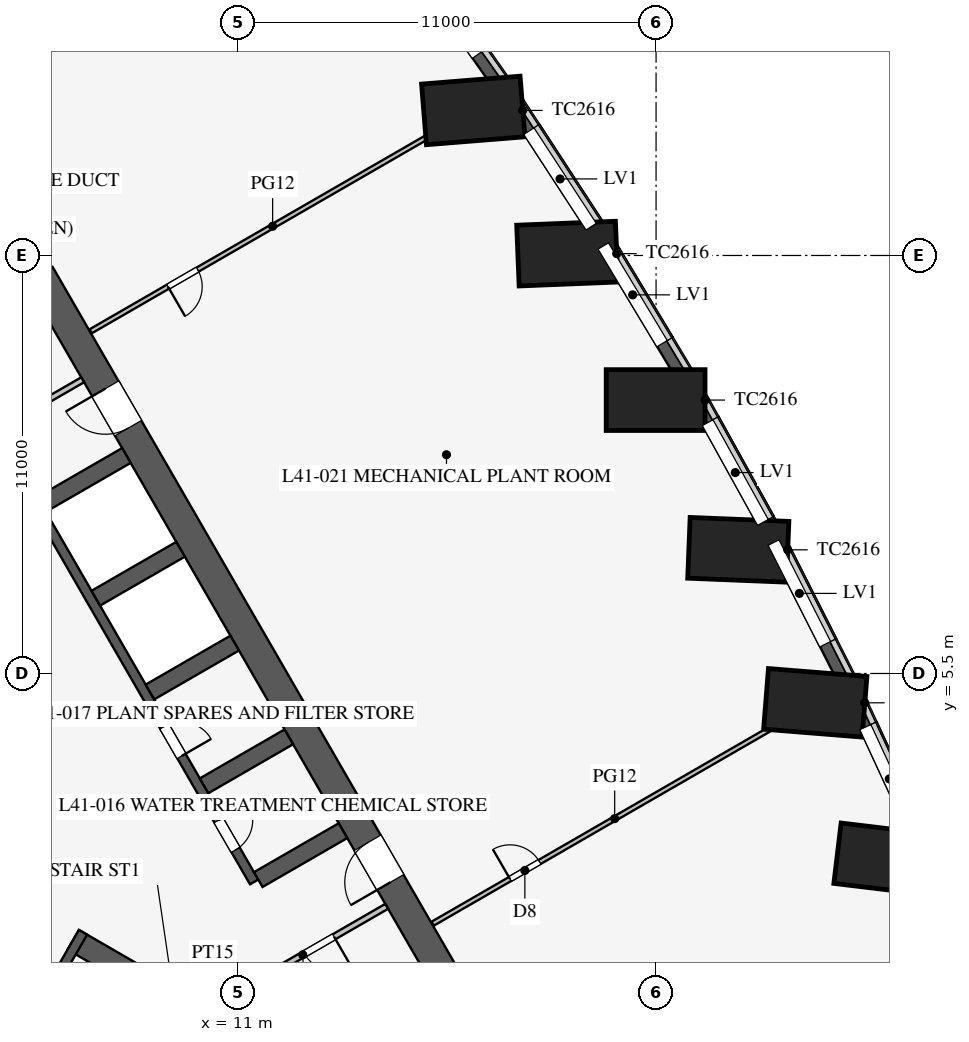
"""IFC4 building model, lengths in metres.
Left out: names, types, materials, properties, quantities, classifications, styles, units other than length and angle.
Written with IfcOpenShell. Run it as: python <this file> out.ifc"""

import sys

from ifc_helpers import new_model, si_unit, direction, frame, frame_2d, origin, origin_2d, place, context, subcontext, project, spatial, polyline, rectangle, outline, extrude, clip, halfspace, element, fill, save


model = new_model("IFC4")
c1 = context("Model", 3, precision=1e-05, world=origin(), true_north=direction((0.0, 1.0)))
c2 = subcontext(c1, "Body", "Model", "MODEL_VIEW")
j1 = project(units=[si_unit("LENGTHUNIT", "METRE"), si_unit("PLANEANGLEUNIT", "RADIAN")], contexts=[c1])
p1 = place(None, origin())
s1 = spatial("IfcSite", under=j1, at=p1, CompositionType="ELEMENT")
p2 = place(p1, origin())
s2 = spatial("IfcBuilding", under=s1, at=p2, CompositionType="ELEMENT")
p3 = place(p2, frame((0.0, 0.0, 178.7)))
s3 = spatial("IfcBuildingStorey", under=s2, at=p3, CompositionType="ELEMENT", Elevation=178.7)
p4 = place(p3, frame((30.077, -3.42, 0.0), z_axis=(-0.231966146532, -0.13391860006, 0.963461216355), x_axis=(-0.36168243427, 0.93133790261, 0.042373669911)))
e1 = element("IfcColumn", 1, at=p4, inside=s3, PredefinedType="COLUMN", context=c2, shape_type="Clipping", body=[
    clip(clip(extrude(rectangle(XDim=2.6, YDim=1.6, at=origin_2d()), origin(), (0.0, 0.0, 1.0), 6.228), halfspace(frame((0.0, 0.0, 0.278), z_axis=(-6.917197328398794e-06, 4.213036003897219e-06, 0.9999999999672015), x_axis=(0.0, 0.9999999999911252, -4.213036003998011e-06)), True)), halfspace(frame((0.0, 0.0, 5.95), z_axis=(6.917197328398794e-06, -4.213036003897219e-06, -0.9999999999672015), x_axis=(0.0, -0.9999999999911252, 4.213036003998011e-06)), True)),
])
p5 = place(p3, frame((28.325, 0.765, 0.0), z_axis=(-0.210679538915, -0.121600535668, 0.969962598046), x_axis=(-0.396030042984, 0.91777825869, 0.029039162011)))
e2 = element("IfcColumn", 2, at=p5, inside=s3, PredefinedType="COLUMN", context=c2, shape_type="Clipping", body=[
    clip(clip(extrude(rectangle(XDim=2.6, YDim=1.6, at=origin_2d()), origin(), (0.0, 0.0, 1.0), 6.186), halfspace(frame((0.0, 0.0, 0.239), z_axis=(-3.0378180671815358e-05, -3.820048547931165e-06, 0.9999999995312867), x_axis=(0.0, 0.9999999999927036, 3.8200485496938e-06)), True)), halfspace(frame((0.0, 0.0, 5.947), z_axis=(3.0378180671815358e-05, 3.820048547931165e-06, -0.9999999995312867), x_axis=(0.0, -0.9999999999927036, -3.8200485496938e-06)), True)),
])
p6 = place(p3, frame((26.43, 4.867, 0.0), z_axis=(-0.195428167391, -0.112817153021, 0.974207432416), x_axis=(-0.430939361595, 0.902200723906, 0.018031095686)))
e3 = element("IfcColumn", 3, at=p6, inside=s3, PredefinedType="COLUMN", context=c2, shape_type="Clipping", body=[
    clip(clip(extrude(rectangle(XDim=2.6, YDim=1.6, at=origin_2d()), origin(), (0.0, 0.0, 1.0), 6.159), halfspace(frame((0.0, 0.0, 0.21), z_axis=(-1.266096880684145e-05, 1.3217046998748039e-05, 0.9999999998325048), x_axis=(0.0, 0.9999999999126549, -1.3217046999807387e-05)), True)), halfspace(frame((0.0, 0.0, 5.949), z_axis=(1.266096880684145e-05, -1.3217046998748039e-05, -0.9999999998325048), x_axis=(0.0, -0.9999999999126549, 1.3217046999807387e-05)), True)),
])
p7 = place(p3, frame((24.393, 8.887, 0.0), z_axis=(-0.186289343802, -0.107569380049, 0.976588505391), x_axis=(-0.465785984336, 0.884855476791, 0.008614057662)))
e4 = element("IfcColumn", 4, at=p7, inside=s3, PredefinedType="COLUMN", context=c2, shape_type="Clipping", body=[
    clip(clip(extrude(rectangle(XDim=2.6, YDim=1.6, at=origin_2d()), origin(), (0.0, 0.0, 1.0), 6.144), halfspace(frame((0.0, 0.0, 0.189), z_axis=(1.3014513908404109e-05, 3.509830411391191e-06, 0.9999999999091518), x_axis=(0.0, 0.9999999999938406, -3.5098304116884342e-06)), True)), halfspace(frame((0.0, 0.0, 5.955), z_axis=(-1.3014513908404109e-05, -3.509830411391191e-06, -0.9999999999091518), x_axis=(0.0, -0.9999999999938406, 3.5098304116884342e-06)), True)),
])
p8 = place(p3, frame((22.213, 12.825, 0.0), z_axis=(-0.183253727016, -0.105824255119, 0.97735321075), x_axis=(-0.500080332001, 0.865979019114, 0.0)))
e5 = element("IfcColumn", 5, at=p8, inside=s3, PredefinedType="COLUMN", context=c2, shape_type="Clipping", body=[
    clip(clip(extrude(rectangle(XDim=2.6, YDim=1.6, at=origin_2d()), origin(), (0.0, 0.0, 1.0), 6.139), halfspace(frame((0.0, 0.0, 0.174), z_axis=(1.962931837797242e-05, -1.1078215543997016e-05, 0.9999999997459816), x_axis=(0.0, 0.9999999999386366, 1.107821554613129e-05)), True)), halfspace(frame((0.0, 0.0, 5.965), z_axis=(-1.962931837797242e-05, 1.1078215543997016e-05, -0.9999999997459816), x_axis=(0.0, -0.9999999999386366, -1.107821554613129e-05)), True)),
])
p9 = place(p3, frame((19.893, 16.681, 0.0), z_axis=(-0.186289343802, -0.107569380049, 0.976588505391), x_axis=(-0.533517685828, 0.845745042504, -0.008614057662)))
e6 = element("IfcColumn", 6, at=p9, inside=s3, PredefinedType="COLUMN", context=c2, shape_type="Clipping", body=[
    clip(clip(extrude(rectangle(XDim=2.6, YDim=1.6, at=origin_2d()), origin(), (0.0, 0.0, 1.0), 6.144), halfspace(frame((0.0, 0.0, 0.188), z_axis=(1.3253644547951e-05, 2.4571096812753272e-06, 0.9999999999091518), x_axis=(0.0, 0.9999999999969813, -2.457109681491134e-06)), True)), halfspace(frame((0.0, 0.0, 5.955), z_axis=(-1.3253644547951e-05, -2.4571096812753272e-06, -0.9999999999091518), x_axis=(0.0, -0.9999999999969813, 2.457109681491134e-06)), True)),
])
p10 = place(p3, frame((17.43, 20.456, 0.0), z_axis=(-0.195428167391, -0.112817153021, 0.974207432416), x_axis=(-0.565774582808, 0.824362784845, -0.018031095686)))
e7 = element("IfcColumn", 7, at=p10, inside=s3, PredefinedType="COLUMN", context=c2, shape_type="Clipping", body=[
    clip(clip(extrude(rectangle(XDim=2.6, YDim=1.6, at=origin_2d()), origin(), (0.0, 0.0, 1.0), 6.159), halfspace(frame((0.0, 0.0, 0.21), z_axis=(-1.0393805708591025e-05, 1.5065167287081627e-05, 0.9999999998325048), x_axis=(0.0, 0.9999999998865204, -1.5065167287895381e-05)), True)), halfspace(frame((0.0, 0.0, 5.949), z_axis=(1.0393805708591025e-05, -1.5065167287081627e-05, -0.9999999998325048), x_axis=(0.0, -0.9999999998865204, 1.5065167287895381e-05)), True)),
])
p11 = place(p3, frame((16.743, -3.0, 0.0), z_axis=(0.0, 0.0, 1.0), x_axis=(-0.500002442456, 0.866023993627, 0.0)))
e8 = element("IfcWall", 8, at=p11, inside=s3, PredefinedType="SHEAR", context=c2, shape_type="SweptSolid", body=[
    extrude(rectangle(XDim=21.939, YDim=0.8, at=frame_2d((10.97, 0.0))), origin(), (0.0, 0.0, 1.0), 6.0),
])
p12 = place(p11, frame((17.27, 0.0, 0.0)))
e9 = element("IfcOpeningElement", 9, at=p12, cuts=e8, PredefinedType="OPENING", context=c2, shape_type="SweptSolid", body=[
    extrude(rectangle(XDim=1.2, YDim=2.1, at=frame_2d((0.6, 1.05))), frame((0.0, 0.41, 0.0), z_axis=(0.0, -1.0, 0.0), x_axis=(1.0, 0.0, 0.0)), (0.0, 0.0, 1.0), 0.82),
])
p13 = place(p11, frame((3.47, 0.0, 0.0)))
e10 = element("IfcOpeningElement", 10, at=p13, cuts=e8, PredefinedType="OPENING", context=c2, shape_type="SweptSolid", body=[
    extrude(rectangle(XDim=1.2, YDim=2.1, at=frame_2d((0.6, 1.05))), frame((0.0, 0.41, 0.0), z_axis=(0.0, -1.0, 0.0), x_axis=(1.0, 0.0, 0.0)), (0.0, 0.0, 1.0), 0.82),
])
p14 = place(p3, frame((11.424, 0.014, 0.0), z_axis=(0.0, 0.0, 1.0), x_axis=(-0.500001763848, 0.866024385424, 0.0)))
e11 = element("IfcWall", 11, at=p14, inside=s3, PredefinedType="SHEAR", context=c2, shape_type="SweptSolid", body=[
    extrude(rectangle(XDim=11.4, YDim=0.25, at=frame_2d((5.7, 0.0))), origin(), (0.0, 0.0, 1.0), 6.0),
])
p15 = place(p14, frame((0.975, 0.0, 0.0)))
e12 = element("IfcOpeningElement", 12, at=p15, cuts=e11, PredefinedType="OPENING", context=c2, shape_type="SweptSolid", body=[
    extrude(rectangle(XDim=0.9, YDim=2.1, at=frame_2d((0.45, 1.05))), frame((0.0, 0.135, 0.0), z_axis=(0.0, -1.0, 0.0), x_axis=(1.0, 0.0, 0.0)), (0.0, 0.0, 1.0), 0.27),
])
p16 = place(p14, frame((3.825, 0.0, 0.0)))
e13 = element("IfcOpeningElement", 13, at=p16, cuts=e11, PredefinedType="OPENING", context=c2, shape_type="SweptSolid", body=[
    extrude(rectangle(XDim=0.9, YDim=2.1, at=frame_2d((0.45, 1.05))), frame((0.0, 0.135, 0.0), z_axis=(0.0, -1.0, 0.0), x_axis=(1.0, 0.0, 0.0)), (0.0, 0.0, 1.0), 0.27),
])
for number, where, z_axis, x_axis in (
    (14, (11.532, 0.076, 0.0), (0.0, 0.0, 1.0), (0.866, 0.5, 0.0)),
    (15, (10.107, 2.544, 0.0), (0.0, 0.0, 1.0), (0.866, 0.5, 0.0)),
    (16, (8.682, 5.012, 0.0), (0.0, 0.0, 1.0), (0.866, 0.5, 0.0)),
    (17, (7.257, 7.481, 0.0), (0.0, 0.0, 1.0), (0.866, 0.5, 0.0)),
):
    element("IfcWall", number, at=place(p3, frame(where, z_axis=z_axis, x_axis=x_axis)), inside=s3, PredefinedType="SHEAR", context=c2, shape_type="SweptSolid", body=[
        extrude(rectangle(XDim=2.575, YDim=0.45, at=frame_2d((1.288, 0.0))), origin(), (0.0, 0.0, 1.0), 6.0),
    ])
p17 = place(p3, frame((5.832, 9.949, 0.0), z_axis=(0.0, 0.0, 1.0), x_axis=(0.866029291668, 0.499993265928, 0.0)))
e18 = element("IfcWall", 18, at=p17, inside=s3, PredefinedType="SHEAR", context=c2, shape_type="SweptSolid", body=[
    extrude(rectangle(XDim=2.575, YDim=0.45, at=frame_2d((1.288, 0.0))), origin(), (0.0, 0.0, 1.0), 6.0),
])
p18 = place(p3, frame((6.663, -1.509, 0.0), z_axis=(0.0, 0.0, 1.0), x_axis=(0.866019375473, -0.500010441196, 0.0)))
e19 = element("IfcWall", 19, at=p18, inside=s3, PredefinedType="SHEAR", context=c2, shape_type="SweptSolid", body=[
    extrude(rectangle(XDim=9.075, YDim=0.6, at=frame_2d((4.538, 0.0))), origin(), (0.0, 0.0, 1.0), 6.0),
])
p19 = place(p3, frame((4.597, -5.339, 0.0), z_axis=(0.0, 0.0, 1.0), x_axis=(0.499984536904, 0.866034331223, 0.0)))
e20 = element("IfcWall", 20, at=p19, inside=s3, PredefinedType="SHEAR", context=c2, shape_type="SweptSolid", body=[
    extrude(rectangle(XDim=4.65, YDim=0.25, at=frame_2d((2.325, 0.0))), origin(), (0.0, 0.0, 1.0), 6.0),
])
p20 = place(p19, frame((1.525, 0.0, 0.0)))
e21 = element("IfcOpeningElement", 21, at=p20, cuts=e20, PredefinedType="OPENING", context=c2, shape_type="SweptSolid", body=[
    extrude(rectangle(XDim=1.6, YDim=2.1, at=frame_2d((0.8, 1.05))), frame((0.0, 0.135, 0.0), z_axis=(0.0, -1.0, 0.0), x_axis=(1.0, 0.0, 0.0)), (0.0, 0.0, 1.0), 0.27),
])
p21 = place(p3, frame((28.892, 1.093, 0.0), z_axis=(0.0, 0.0, 1.0), x_axis=(-0.419948870618, 0.907547765171, 0.0)))
e22 = element("IfcWall", 22, at=p21, inside=s3, PredefinedType="SOLIDWALL", context=c2, shape_type="SweptSolid", body=[
    extrude(rectangle(XDim=4.518, YDim=0.3, at=frame_2d((2.259, 0.0))), origin(), (0.0, 0.0, 1.0), 5.8),
])
p22 = place(p21, frame((0.3, 0.0, 3.5)))
e23 = element("IfcOpeningElement", 23, at=p22, cuts=e22, PredefinedType="OPENING", context=c2, shape_type="SweptSolid", body=[
    extrude(rectangle(XDim=3.0, YDim=2.0, at=frame_2d((1.5, 1.0))), frame((0.0, 0.16, 0.0), z_axis=(0.0, -1.0, 0.0), x_axis=(1.0, 0.0, 0.0)), (0.0, 0.0, 1.0), 0.32),
])
p23 = place(p3, frame((26.995, 5.193, 0.0), z_axis=(0.0, 0.0, 1.0), x_axis=(-0.452406735601, 0.891811720927, 0.0)))
e24 = element("IfcWall", 24, at=p23, inside=s3, PredefinedType="SOLIDWALL", context=c2, shape_type="SweptSolid", body=[
    extrude(rectangle(XDim=4.507, YDim=0.3, at=frame_2d((2.253, 0.0))), origin(), (0.0, 0.0, 1.0), 5.8),
])
p24 = place(p23, frame((1.207, 0.0, 3.5)))
e25 = element("IfcOpeningElement", 25, at=p24, cuts=e24, PredefinedType="OPENING", context=c2, shape_type="SweptSolid", body=[
    extrude(rectangle(XDim=3.0, YDim=2.0, at=frame_2d((1.5, 1.0))), frame((0.0, 0.16, 0.0), z_axis=(0.0, -1.0, 0.0), x_axis=(1.0, 0.0, 0.0)), (0.0, 0.0, 1.0), 0.32),
])
p25 = place(p3, frame((24.956, 9.212, 0.0), z_axis=(0.0, 0.0, 1.0), x_axis=(-0.48433441842, 0.874882947104, 0.0)))
e26 = element("IfcWall", 26, at=p25, inside=s3, PredefinedType="SOLIDWALL", context=c2, shape_type="SweptSolid", body=[
    extrude(rectangle(XDim=4.501, YDim=0.3, at=frame_2d((2.25, 0.0))), origin(), (0.0, 0.0, 1.0), 5.8),
])
p26 = place(p25, frame((0.3, 0.0, 3.5)))
e27 = element("IfcOpeningElement", 27, at=p26, cuts=e26, PredefinedType="OPENING", context=c2, shape_type="SweptSolid", body=[
    extrude(rectangle(XDim=3.0, YDim=2.0, at=frame_2d((1.5, 1.0))), frame((0.0, 0.16, 0.0), z_axis=(0.0, -1.0, 0.0), x_axis=(1.0, 0.0, 0.0)), (0.0, 0.0, 1.0), 0.32),
])
p27 = place(p3, frame((22.776, 13.15, 0.0), z_axis=(0.0, 0.0, 1.0), x_axis=(-0.515508537432, 0.856884442521, 0.0)))
e28 = element("IfcWall", 28, at=p27, inside=s3, PredefinedType="SOLIDWALL", context=c2, shape_type="SweptSolid", body=[
    extrude(rectangle(XDim=4.5, YDim=0.3, at=frame_2d((2.25, 0.0))), origin(), (0.0, 0.0, 1.0), 5.8),
])
p28 = place(p27, frame((1.201, 0.0, 3.5)))
e29 = element("IfcOpeningElement", 29, at=p28, cuts=e28, PredefinedType="OPENING", context=c2, shape_type="SweptSolid", body=[
    extrude(rectangle(XDim=3.0, YDim=2.0, at=frame_2d((1.5, 1.0))), frame((0.0, 0.16, 0.0), z_axis=(0.0, -1.0, 0.0), x_axis=(1.0, 0.0, 0.0)), (0.0, 0.0, 1.0), 0.32),
])
p29 = place(p3, frame((20.456, 17.006, 0.0), z_axis=(0.0, 0.0, 1.0), x_axis=(-0.546107481908, 0.83771511757, 0.0)))
e30 = element("IfcWall", 30, at=p29, inside=s3, PredefinedType="SOLIDWALL", context=c2, shape_type="SweptSolid", body=[
    extrude(rectangle(XDim=4.507, YDim=0.3, at=frame_2d((2.253, 0.0))), origin(), (0.0, 0.0, 1.0), 5.8),
])
p30 = place(p29, frame((0.3, 0.0, 3.5)))
e31 = element("IfcOpeningElement", 31, at=p30, cuts=e30, PredefinedType="OPENING", context=c2, shape_type="SweptSolid", body=[
    extrude(rectangle(XDim=3.0, YDim=2.0, at=frame_2d((1.5, 1.0))), frame((0.0, 0.16, 0.0), z_axis=(0.0, -1.0, 0.0), x_axis=(1.0, 0.0, 0.0)), (0.0, 0.0, 1.0), 0.32),
])
p31 = place(p3, frame((17.995, 20.782, 0.0), z_axis=(0.0, 0.0, 1.0), x_axis=(-0.575987178736, 0.817458726745, 0.0)))
e32 = element("IfcWall", 32, at=p31, inside=s3, PredefinedType="SOLIDWALL", context=c2, shape_type="SweptSolid", body=[
    extrude(rectangle(XDim=4.518, YDim=0.3, at=frame_2d((2.259, 0.0))), origin(), (0.0, 0.0, 1.0), 5.8),
])
p32 = place(p31, frame((1.218, 0.0, 3.5)))
e33 = element("IfcOpeningElement", 33, at=p32, cuts=e32, PredefinedType="OPENING", context=c2, shape_type="SweptSolid", body=[
    extrude(rectangle(XDim=3.0, YDim=2.0, at=frame_2d((1.5, 1.0))), frame((0.0, 0.16, 0.0), z_axis=(0.0, -1.0, 0.0), x_axis=(1.0, 0.0, 0.0)), (0.0, 0.0, 1.0), 0.32),
])
p33 = place(p3, frame((2.495, 10.678, 0.0), z_axis=(0.0, 0.0, 1.0), x_axis=(0.86602216432, 0.500005610874, 0.0)))
e34 = element("IfcWall", 34, at=p33, inside=s3, PredefinedType="PARTITIONING", context=c2, shape_type="SweptSolid", body=[
    extrude(rectangle(XDim=5.1, YDim=0.15, at=frame_2d((2.55, 0.0))), origin(), (0.0, 0.0, 1.0), 5.8),
])
p34 = place(p33, frame((1.3, 0.0, 0.0)))
e35 = element("IfcOpeningElement", 35, at=p34, cuts=e34, PredefinedType="OPENING", context=c2, shape_type="SweptSolid", body=[
    extrude(rectangle(XDim=0.9, YDim=2.1, at=frame_2d((0.45, 1.05))), frame((0.0, 0.085, 0.0), z_axis=(0.0, -1.0, 0.0), x_axis=(1.0, 0.0, 0.0)), (0.0, 0.0, 1.0), 0.17),
])
p35 = place(p3, frame((10.495, -3.178, 0.0), z_axis=(0.0, 0.0, 1.0), x_axis=(0.86602216432, 0.500005610874, 0.0)))
e36 = element("IfcWall", 36, at=p35, inside=s3, PredefinedType="PARTITIONING", context=c2, shape_type="SweptSolid", body=[
    extrude(rectangle(XDim=5.1, YDim=0.15, at=frame_2d((2.55, 0.0))), origin(), (0.0, 0.0, 1.0), 5.8),
])
p36 = place(p35, frame((2.6, 0.0, 0.0)))
e37 = element("IfcOpeningElement", 37, at=p36, cuts=e36, PredefinedType="OPENING", context=c2, shape_type="SweptSolid", body=[
    extrude(rectangle(XDim=0.9, YDim=2.1, at=frame_2d((0.45, 1.05))), frame((0.0, 0.085, 0.0), z_axis=(0.0, -1.0, 0.0), x_axis=(1.0, 0.0, 0.0)), (0.0, 0.0, 1.0), 0.17),
])
for number, where, z_axis, x_axis in (
    (38, (16.122, 19.7, 0.0), (0.0, 0.0, 1.0), (0.866, 0.5, 0.0)),
    (39, (25.122, 4.112, 0.0), (0.0, 0.0, 1.0), (0.866, 0.5, 0.0)),
):
    element("IfcWall", number, at=place(p3, frame(where, z_axis=z_axis, x_axis=x_axis)), inside=s3, PredefinedType="PARTITIONING", context=c2, shape_type="SweptSolid", body=[
        extrude(outline(polyline([(0.0, 0.0), (0.667, 0.0), (0.667, 0.05), (0.0, 2.9), (0.0, 0.0)])), frame((0.0, 0.06, 0.0), z_axis=(0.0, -1.0, 0.0), x_axis=(1.0, 0.0, 0.0)), (0.0, 0.0, 1.0), 0.12),
    ])
p37 = place(p3, frame((7.122, 14.504, 0.0), z_axis=(0.0, 0.0, 1.0), x_axis=(0.866025583565, 0.49999968861, 0.0)))
e40 = element("IfcWall", 40, at=p37, inside=s3, PredefinedType="PARTITIONING", context=c2, shape_type="SweptSolid", body=[
    extrude(rectangle(XDim=10.393, YDim=0.12, at=frame_2d((5.196, 0.0))), origin(), (0.0, 0.0, 1.0), 2.9),
])
p38 = place(p37, frame((2.35, 0.0, 0.0)))
e41 = element("IfcOpeningElement", 41, at=p38, cuts=e40, PredefinedType="OPENING", context=c2, shape_type="SweptSolid", body=[
    extrude(rectangle(XDim=0.9, YDim=2.1, at=frame_2d((0.45, 1.05))), frame((0.0, 0.07, 0.0), z_axis=(0.0, -1.0, 0.0), x_axis=(1.0, 0.0, 0.0)), (0.0, 0.0, 1.0), 0.14),
])
p39 = place(p3, frame((16.122, -1.084, 0.0), z_axis=(0.0, 0.0, 1.0), x_axis=(0.866025583565, 0.49999968861, 0.0)))
e42 = element("IfcWall", 42, at=p39, inside=s3, PredefinedType="PARTITIONING", context=c2, shape_type="SweptSolid", body=[
    extrude(rectangle(XDim=10.393, YDim=0.12, at=frame_2d((5.196, 0.0))), origin(), (0.0, 0.0, 1.0), 2.9),
])
p40 = place(p39, frame((2.35, 0.0, 0.0)))
e43 = element("IfcOpeningElement", 43, at=p40, cuts=e42, PredefinedType="OPENING", context=c2, shape_type="SweptSolid", body=[
    extrude(rectangle(XDim=0.9, YDim=2.1, at=frame_2d((0.45, 1.05))), frame((0.0, 0.07, 0.0), z_axis=(0.0, -1.0, 0.0), x_axis=(1.0, 0.0, 0.0)), (0.0, 0.0, 1.0), 0.14),
])
p41 = place(p22, origin())
e44 = element("IfcWindow", 44, at=p41, inside=s3, PartitioningType="SINGLE_PANEL", PredefinedType="USERDEFINED", context=c2, shape_type="SweptSolid", body=[
    extrude(rectangle(XDim=3.0, YDim=2.0, at=frame_2d((1.5, 1.0))), frame((0.0, 0.03, 0.0), z_axis=(0.0, -1.0, 0.0), x_axis=(1.0, 0.0, 0.0)), (0.0, 0.0, 1.0), 0.06),
])
fill(e23, e44)
p42 = place(p24, origin())
e45 = element("IfcWindow", 45, at=p42, inside=s3, PartitioningType="SINGLE_PANEL", PredefinedType="USERDEFINED", context=c2, shape_type="SweptSolid", body=[
    extrude(rectangle(XDim=3.0, YDim=2.0, at=frame_2d((1.5, 1.0))), frame((0.0, 0.03, 0.0), z_axis=(0.0, -1.0, 0.0), x_axis=(1.0, 0.0, 0.0)), (0.0, 0.0, 1.0), 0.06),
])
fill(e25, e45)
p43 = place(p26, origin())
e46 = element("IfcWindow", 46, at=p43, inside=s3, PartitioningType="SINGLE_PANEL", PredefinedType="USERDEFINED", context=c2, shape_type="SweptSolid", body=[
    extrude(rectangle(XDim=3.0, YDim=2.0, at=frame_2d((1.5, 1.0))), frame((0.0, 0.03, 0.0), z_axis=(0.0, -1.0, 0.0), x_axis=(1.0, 0.0, 0.0)), (0.0, 0.0, 1.0), 0.06),
])
fill(e27, e46)
p44 = place(p28, origin())
e47 = element("IfcWindow", 47, at=p44, inside=s3, PartitioningType="SINGLE_PANEL", PredefinedType="USERDEFINED", context=c2, shape_type="SweptSolid", body=[
    extrude(rectangle(XDim=3.0, YDim=2.0, at=frame_2d((1.5, 1.0))), frame((0.0, 0.03, 0.0), z_axis=(0.0, -1.0, 0.0), x_axis=(1.0, 0.0, 0.0)), (0.0, 0.0, 1.0), 0.06),
])
fill(e29, e47)
p45 = place(p30, origin())
e48 = element("IfcWindow", 48, at=p45, inside=s3, PartitioningType="SINGLE_PANEL", PredefinedType="USERDEFINED", context=c2, shape_type="SweptSolid", body=[
    extrude(rectangle(XDim=3.0, YDim=2.0, at=frame_2d((1.5, 1.0))), frame((0.0, 0.03, 0.0), z_axis=(0.0, -1.0, 0.0), x_axis=(1.0, 0.0, 0.0)), (0.0, 0.0, 1.0), 0.06),
])
fill(e31, e48)
p46 = place(p32, origin())
e49 = element("IfcWindow", 49, at=p46, inside=s3, PartitioningType="SINGLE_PANEL", PredefinedType="USERDEFINED", context=c2, shape_type="SweptSolid", body=[
    extrude(rectangle(XDim=3.0, YDim=2.0, at=frame_2d((1.5, 1.0))), frame((0.0, 0.03, 0.0), z_axis=(0.0, -1.0, 0.0), x_axis=(1.0, 0.0, 0.0)), (0.0, 0.0, 1.0), 0.06),
])
fill(e33, e49)
p47 = place(p36, frame((0.9, 0.0, 0.0), z_axis=(0.0, 0.0, 1.0), x_axis=(-1.0, 0.0, 0.0)))
e50 = element("IfcDoor", 50, at=p47, inside=s3, OperationType="SINGLE_SWING_LEFT", PredefinedType="DOOR", context=c2, shape_type="SweptSolid", body=[
    extrude(rectangle(XDim=0.9, YDim=2.1, at=frame_2d((0.45, 1.05))), frame((0.0, 0.025, 0.0), z_axis=(0.0, -1.0, 0.0), x_axis=(1.0, 0.0, 0.0)), (0.0, 0.0, 1.0), 0.05),
])
fill(e37, e50)
p48 = place(p12, origin())
e51 = element("IfcDoor", 51, at=p48, inside=s3, OperationType="SINGLE_SWING_RIGHT", PredefinedType="DOOR", context=c2, shape_type="SweptSolid", body=[
    extrude(rectangle(XDim=1.2, YDim=2.1, at=frame_2d((0.6, 1.05))), frame((0.0, 0.025, 0.0), z_axis=(0.0, -1.0, 0.0), x_axis=(1.0, 0.0, 0.0)), (0.0, 0.0, 1.0), 0.05),
])
fill(e9, e51)
p49 = place(p13, origin())
e52 = element("IfcDoor", 52, at=p49, inside=s3, OperationType="SINGLE_SWING_LEFT", PredefinedType="DOOR", context=c2, shape_type="SweptSolid", body=[
    extrude(rectangle(XDim=1.2, YDim=2.1, at=frame_2d((0.6, 1.05))), frame((0.0, 0.025, 0.0), z_axis=(0.0, -1.0, 0.0), x_axis=(1.0, 0.0, 0.0)), (0.0, 0.0, 1.0), 0.05),
])
fill(e10, e52)
p50 = place(p15, frame((0.9, 0.0, 0.0), z_axis=(0.0, 0.0, 1.0), x_axis=(-1.0, 0.0, 0.0)))
e53 = element("IfcDoor", 53, at=p50, inside=s3, OperationType="SINGLE_SWING_LEFT", PredefinedType="DOOR", context=c2, shape_type="SweptSolid", body=[
    extrude(rectangle(XDim=0.9, YDim=2.1, at=frame_2d((0.45, 1.05))), frame((0.0, 0.025, 0.0), z_axis=(0.0, -1.0, 0.0), x_axis=(1.0, 0.0, 0.0)), (0.0, 0.0, 1.0), 0.05),
])
fill(e12, e53)
p51 = place(p16, frame((0.9, 0.0, 0.0), z_axis=(0.0, 0.0, 1.0), x_axis=(-1.0, 0.0, 0.0)))
e54 = element("IfcDoor", 54, at=p51, inside=s3, OperationType="SINGLE_SWING_RIGHT", PredefinedType="DOOR", context=c2, shape_type="SweptSolid", body=[
    extrude(rectangle(XDim=0.9, YDim=2.1, at=frame_2d((0.45, 1.05))), frame((0.0, 0.025, 0.0), z_axis=(0.0, -1.0, 0.0), x_axis=(1.0, 0.0, 0.0)), (0.0, 0.0, 1.0), 0.05),
])
fill(e13, e54)
p52 = place(p38, frame((0.9, 0.0, 0.0), z_axis=(0.0, 0.0, 1.0), x_axis=(-1.0, 0.0, 0.0)))
e55 = element("IfcDoor", 55, at=p52, inside=s3, OperationType="SINGLE_SWING_RIGHT", PredefinedType="DOOR", context=c2, shape_type="SweptSolid", body=[
    extrude(rectangle(XDim=0.9, YDim=2.1, at=frame_2d((0.45, 1.05))), frame((0.0, 0.025, 0.0), z_axis=(0.0, -1.0, 0.0), x_axis=(1.0, 0.0, 0.0)), (0.0, 0.0, 1.0), 0.05),
])
fill(e41, e55)
p53 = place(p40, origin())
e56 = element("IfcDoor", 56, at=p53, inside=s3, OperationType="SINGLE_SWING_LEFT", PredefinedType="DOOR", context=c2, shape_type="SweptSolid", body=[
    extrude(rectangle(XDim=0.9, YDim=2.1, at=frame_2d((0.45, 1.05))), frame((0.0, 0.025, 0.0), z_axis=(0.0, -1.0, 0.0), x_axis=(1.0, 0.0, 0.0)), (0.0, 0.0, 1.0), 0.05),
])
fill(e43, e56)
save(model, sys.argv[1])
